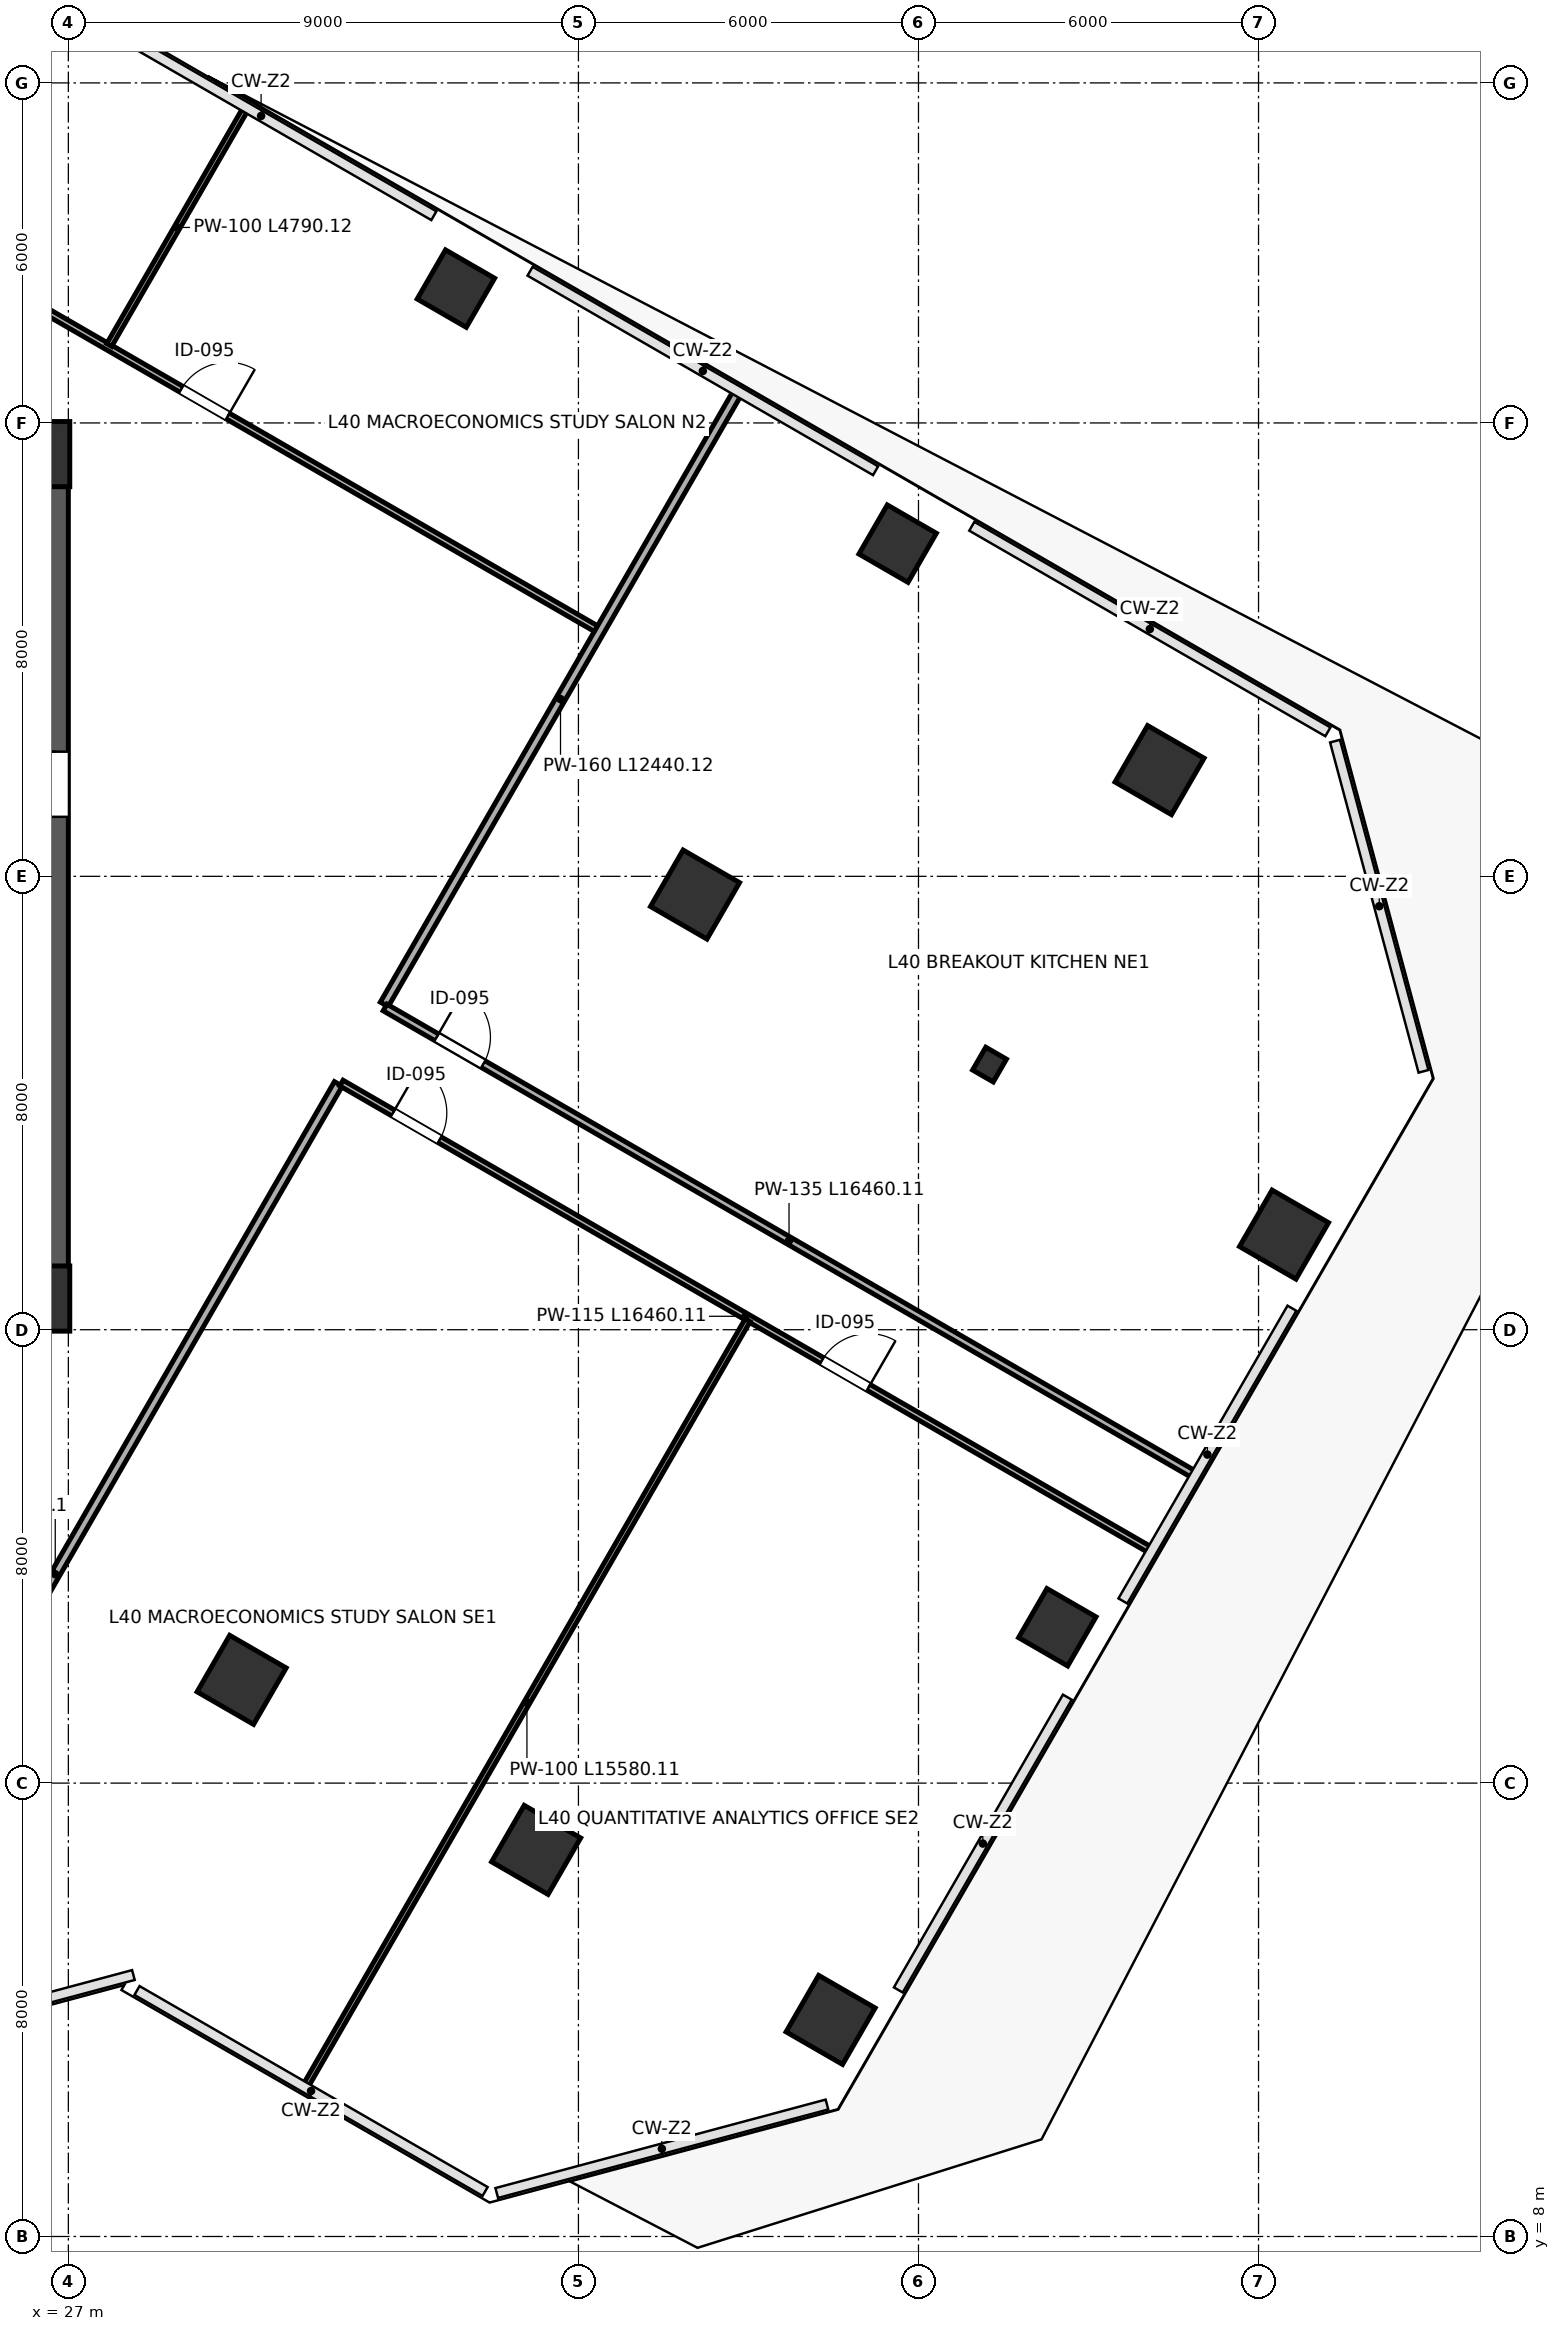
"""IFC4 building model, lengths in metres.
Left out: names, types, materials, properties, quantities, classifications, styles, units other than length and angle.
Written with IfcOpenShell. Run it as: python <this file> out.ifc"""

import sys

from ifc_helpers import new_model, si_unit, direction, frame, frame_2d, origin, origin_2d, place, context, subcontext, project, spatial, rectangle, i_section, extrude, source, transform, mapped, element, fill, save


model = new_model("IFC4")
c1 = context("Model", 3, precision=1e-05, world=origin(), true_north=direction((0.0, 1.0)))
c2 = subcontext(c1, "Body", "Model", "MODEL_VIEW")
j1 = project(units=[si_unit("LENGTHUNIT", "METRE"), si_unit("PLANEANGLEUNIT", "RADIAN")], contexts=[c1])
p1 = place(None, origin())
s1 = spatial("IfcSite", under=j1, at=p1, CompositionType="ELEMENT")
p2 = place(p1, origin())
s2 = spatial("IfcBuilding", under=s1, at=p2, CompositionType="ELEMENT")
p3 = place(p2, frame((0.0, 0.0, 179.2)))
s3 = spatial("IfcBuildingStorey", under=s2, at=p3, CompositionType="ELEMENT", Elevation=179.2)
m1 = source(origin(), c2, "Body", "SweptSolid", [
    extrude(rectangle(XDim=1.15, YDim=1.15, at=origin_2d()), origin(), (0.0, 0.0, 1.0), 4.198),
])
for number, where, z_axis, x_axis in (
    (1, (26.45, 24.55, 0.001), (0.0, 0.0, 1.0), (1.0, 0.0, 0.0)),
    (2, (26.45, 39.45, 0.001), (0.0, 0.0, 1.0), (1.0, 0.0, 0.0)),
):
    element("IfcColumn", number, at=place(p3, frame(where, z_axis=z_axis, x_axis=x_axis)), inside=s3, PredefinedType="COLUMN", context=c2, shape_type="MappedRepresentation", body=[
        mapped(m1, transform((0.0, 0.0, 0.0), scale=1.0)),
    ])
m2 = source(origin(), c2, "Body", "SweptSolid", [
    extrude(rectangle(XDim=1.0, YDim=1.0, at=origin_2d()), origin(), (0.0, 0.0, 1.0), 4.198),
])
for number, where, z_axis, x_axis in (
    (3, (26.044, 46.87, 0.001), (0.0, 0.0, 1.0), (-0.866, 0.5, 0.0)),
    (4, (33.838, 42.37, 0.001), (0.0, 0.0, 1.0), (-0.866, 0.5, 0.0)),
):
    element("IfcColumn", number, at=place(p3, frame(where, z_axis=z_axis, x_axis=x_axis)), inside=s3, PredefinedType="COLUMN", context=c2, shape_type="MappedRepresentation", body=[
        mapped(m2, transform((0.0, 0.0, 0.0), scale=1.0)),
    ])
for number, where, z_axis, x_axis in (
    (5, (30.057, 17.822, 0.001), (0.0, 0.0, 1.0), (-0.866, 0.5, 0.0)),
    (6, (38.057, 31.678, 0.001), (0.0, 0.0, 1.0), (-0.866, 0.5, 0.0)),
):
    element("IfcColumn", number, at=place(p3, frame(where, z_axis=z_axis, x_axis=x_axis)), inside=s3, PredefinedType="COLUMN", context=c2, shape_type="MappedRepresentation", body=[
        mapped(m1, transform((0.0, 0.0, 0.0), scale=1.0)),
    ])
p4 = place(p3, frame((41.632, 37.87, 0.001), z_axis=(0.0, 0.0, 1.0), x_axis=(-0.866025403784, 0.5, 0.0)))
e7 = element("IfcColumn", 7, at=p4, inside=s3, PredefinedType="COLUMN", context=c2, shape_type="MappedRepresentation", body=[
    mapped(m2, transform((0.0, 0.0, 0.0), scale=1.0)),
])
p5 = place(p3, frame((35.253, 14.822, 0.001), z_axis=(0.0, 0.0, 1.0), x_axis=(-0.866025403784, 0.5, 0.0)))
e8 = element("IfcColumn", 8, at=p5, inside=s3, PredefinedType="COLUMN", context=c2, shape_type="MappedRepresentation", body=[
    mapped(m1, transform((0.0, 0.0, 0.0), scale=1.0)),
])
m3 = source(origin(), c2, "Body", "SweptSolid", [
    extrude(i_section(OverallWidth=0.421, OverallDepth=0.465, WebThickness=0.045, FlangeThickness=0.072, FilletRadius=0.015, at=origin_2d()), origin(), (0.0, 0.0, 1.0), 4.198),
])
p6 = place(p3, frame((43.253, 28.678, 0.001), z_axis=(0.0, 0.0, 1.0), x_axis=(-0.866025403784, 0.5, 0.0)))
e9 = element("IfcColumn", 9, at=p6, inside=s3, PredefinedType="COLUMN", context=c2, shape_type="MappedRepresentation", body=[
    mapped(m3, transform((0.0, 0.0, 0.0), scale=1.0)),
])
p7 = place(p3, frame((46.253, 33.875, 0.001), z_axis=(0.0, 0.0, 1.0), x_axis=(-0.866025403784, 0.5, 0.0)))
e10 = element("IfcColumn", 10, at=p7, inside=s3, PredefinedType="COLUMN", context=c2, shape_type="MappedRepresentation", body=[
    mapped(m1, transform((0.0, 0.0, 0.0), scale=1.0)),
])
m4 = source(origin(), c2, "Body", "SweptSolid", [
    extrude(rectangle(XDim=1.15, YDim=1.15, at=origin_2d()), origin(), (0.0, 0.0, 1.0), 4.198),
])
p8 = place(p3, frame((40.45, 11.822, 0.001), z_axis=(0.0, 0.0, 1.0), x_axis=(-0.866025403784, 0.5, 0.0)))
e11 = element("IfcColumn", 11, at=p8, inside=s3, PredefinedType="COLUMN", context=c2, shape_type="MappedRepresentation", body=[
    mapped(m4, transform((0.0, 0.0, 0.0), scale=1.0)),
])
p9 = place(p3, frame((44.45, 18.75, 0.001), z_axis=(0.0, 0.0, 1.0), x_axis=(-0.866025403784, 0.5, 0.0)))
e12 = element("IfcColumn", 12, at=p9, inside=s3, PredefinedType="COLUMN", context=c2, shape_type="MappedRepresentation", body=[
    mapped(m2, transform((0.0, 0.0, 0.0), scale=1.0)),
])
p10 = place(p3, frame((48.45, 25.678, 0.001), z_axis=(0.0, 0.0, 1.0), x_axis=(-0.866025403784, 0.5, 0.0)))
e13 = element("IfcColumn", 13, at=p10, inside=s3, PredefinedType="COLUMN", context=c2, shape_type="MappedRepresentation", body=[
    mapped(m4, transform((0.0, 0.0, 0.0), scale=1.0)),
])
p11 = place(p3, frame((26.775, 24.45, 0.0), z_axis=(0.0, 0.0, 1.0), x_axis=(0.0, 1.0, 0.0)))
e14 = element("IfcWall", 14, at=p11, inside=s3, PredefinedType="SHEAR", context=c2, shape_type="SweptSolid", body=[
    extrude(rectangle(XDim=15.1, YDim=0.45, at=frame_2d((7.55, 0.0))), origin(), (0.0, 0.0, 1.0), 3.96),
])
p12 = place(p11, frame((8.6, 0.0, 0.0)))
e15 = element("IfcOpeningElement", 15, at=p12, cuts=e14, PredefinedType="OPENING", context=c2, shape_type="SweptSolid", body=[
    extrude(rectangle(XDim=1.15, YDim=2.2, at=frame_2d((0.575, 1.1))), frame((0.0, 0.235, 0.0), z_axis=(0.0, -1.0, 0.0), x_axis=(1.0, 0.0, 0.0)), (0.0, 0.0, 1.0), 0.47),
])
for number, where, z_axis, x_axis in (
    (16, (9.0, 24.225, 0.0), (0.0, 0.0, 1.0), (1.0, 0.0, 0.0)),
    (17, (9.0, 39.775, 0.0), (0.0, 0.0, 1.0), (1.0, 0.0, 0.0)),
):
    element("IfcWall", number, at=place(p3, frame(where, z_axis=z_axis, x_axis=x_axis)), inside=s3, PredefinedType="SHEAR", context=c2, shape_type="SweptSolid", body=[
        extrude(rectangle(XDim=18.0, YDim=0.45, at=frame_2d((9.0, 0.0))), origin(), (0.0, 0.0, 1.0), 3.96),
    ])
p13 = place(p3, frame((13.23, 49.696, 0.0), z_axis=(0.0, 0.0, 1.0), x_axis=(0.866026251752, -0.499998531275, 0.0)))
e18 = element("IfcWall", 18, at=p13, inside=s3, PredefinedType="PARTITIONING", context=c2, shape_type="SweptSolid", body=[
    extrude(rectangle(XDim=26.69, YDim=0.115, at=frame_2d((13.345, 0.0))), origin(), (0.0, 0.0, 1.0), 3.96),
])
p14 = place(p13, frame((2.1, 0.0, 0.0)))
e19 = element("IfcOpeningElement", 19, at=p14, cuts=e18, PredefinedType="OPENING", context=c2, shape_type="SweptSolid", body=[
    extrude(rectangle(XDim=0.95, YDim=2.15, at=frame_2d((0.475, 1.075))), frame((0.0, 0.067, 0.0), z_axis=(0.0, -1.0, 0.0), x_axis=(1.0, 0.0, 0.0)), (0.0, 0.0, 1.0), 0.135),
])
p15 = place(p13, frame((18.2, 0.0, 0.0)))
e20 = element("IfcOpeningElement", 20, at=p15, cuts=e18, PredefinedType="OPENING", context=c2, shape_type="SweptSolid", body=[
    extrude(rectangle(XDim=0.95, YDim=2.15, at=frame_2d((0.475, 1.075))), frame((0.0, 0.067, 0.0), z_axis=(0.0, -1.0, 0.0), x_axis=(1.0, 0.0, 0.0)), (0.0, 0.0, 1.0), 0.135),
])
p16 = place(p3, frame((27.721, 41.375, 0.0), z_axis=(0.0, 0.0, 1.0), x_axis=(0.500009234706, 0.866020072059, 0.0)))
e21 = element("IfcWall", 21, at=p16, inside=s3, PredefinedType="PARTITIONING", context=c2, shape_type="SweptSolid", body=[
    extrude(rectangle(XDim=4.79, YDim=0.1, at=frame_2d((2.395, 0.0))), origin(), (0.0, 0.0, 1.0), 3.195),
])
p17 = place(p3, frame((32.574, 29.74, 0.0), z_axis=(0.0, 0.0, 1.0), x_axis=(0.499986899807, 0.866032967052, 0.0)))
e22 = element("IfcWall", 22, at=p17, inside=s3, PredefinedType="PARTITIONING", context=c2, shape_type="SweptSolid", body=[
    extrude(rectangle(XDim=12.44, YDim=0.16, at=frame_2d((6.22, 0.0))), origin(), (0.0, 0.0, 1.0), 3.195),
])
p18 = place(p3, frame((21.774, 11.034, 0.0), z_axis=(0.0, 0.0, 1.0), x_axis=(0.500008037328, 0.866020763381, 0.0)))
e23 = element("IfcWall", 23, at=p18, inside=s3, PredefinedType="PARTITIONING", context=c2, shape_type="SweptSolid", body=[
    extrude(rectangle(XDim=19.98, YDim=0.16, at=frame_2d((9.99, 0.0))), origin(), (0.0, 0.0, 1.0), 3.96),
])
p19 = place(p3, frame((32.588, 29.686, 0.0), z_axis=(0.0, 0.0, 1.0), x_axis=(0.86602750728, -0.499996356621, 0.0)))
e24 = element("IfcWall", 24, at=p19, inside=s3, PredefinedType="PARTITIONING", context=c2, shape_type="SweptSolid", body=[
    extrude(rectangle(XDim=16.46, YDim=0.135, at=frame_2d((8.23, 0.0))), origin(), (0.0, 0.0, 1.0), 3.96),
])
p20 = place(p19, frame((1.05, 0.0, 0.0)))
e25 = element("IfcOpeningElement", 25, at=p20, cuts=e24, PredefinedType="OPENING", context=c2, shape_type="SweptSolid", body=[
    extrude(rectangle(XDim=0.95, YDim=2.15, at=frame_2d((0.475, 1.075))), frame((0.0, 0.078, 0.0), z_axis=(0.0, -1.0, 0.0), x_axis=(1.0, 0.0, 0.0)), (0.0, 0.0, 1.0), 0.155),
])
p21 = place(p3, frame((31.818, 28.352, 0.0), z_axis=(0.0, 0.0, 1.0), x_axis=(0.86602750728, -0.499996356621, 0.0)))
e26 = element("IfcWall", 26, at=p21, inside=s3, PredefinedType="PARTITIONING", context=c2, shape_type="SweptSolid", body=[
    extrude(rectangle(XDim=16.46, YDim=0.115, at=frame_2d((8.23, 0.0))), origin(), (0.0, 0.0, 1.0), 3.96),
])
p22 = place(p21, frame((1.05, 0.0, 0.0)))
e27 = element("IfcOpeningElement", 27, at=p22, cuts=e26, PredefinedType="OPENING", context=c2, shape_type="SweptSolid", body=[
    extrude(rectangle(XDim=0.95, YDim=2.15, at=frame_2d((0.475, 1.075))), frame((0.0, 0.067, 0.0), z_axis=(0.0, -1.0, 0.0), x_axis=(1.0, 0.0, 0.0)), (0.0, 0.0, 1.0), 0.135),
])
p23 = place(p21, frame((9.79, 0.0, 0.0)))
e28 = element("IfcOpeningElement", 28, at=p23, cuts=e26, PredefinedType="OPENING", context=c2, shape_type="SweptSolid", body=[
    extrude(rectangle(XDim=0.95, YDim=2.15, at=frame_2d((0.475, 1.075))), frame((0.0, 0.067, 0.0), z_axis=(0.0, -1.0, 0.0), x_axis=(1.0, 0.0, 0.0)), (0.0, 0.0, 1.0), 0.135),
])
p24 = place(p3, frame((31.196, 10.675, 0.0), z_axis=(0.0, 0.0, 1.0), x_axis=(0.500001880682, 0.866024317969, 0.0)))
e29 = element("IfcWall", 29, at=p24, inside=s3, PredefinedType="PARTITIONING", context=c2, shape_type="SweptSolid", body=[
    extrude(rectangle(XDim=15.58, YDim=0.1, at=frame_2d((7.79, 0.0))), origin(), (0.0, 0.0, 1.0), 3.96),
])
m5 = source(origin(), c2, "Body", "SweptSolid", [
    extrude(rectangle(XDim=1.15, YDim=2.2, at=frame_2d((0.575, 1.1))), frame((0.0, 0.025, 0.0), z_axis=(0.0, -1.0, 0.0), x_axis=(1.0, 0.0, 0.0)), (0.0, 0.0, 1.0), 0.05),
])
p25 = place(p12, origin())
e30 = element("IfcDoor", 30, at=p25, inside=s3, OperationType="SINGLE_SWING_RIGHT", PredefinedType="DOOR", context=c2, shape_type="MappedRepresentation", body=[
    mapped(m5, transform((0.0, 0.0, 0.0), scale=1.0)),
])
fill(e15, e30)
m6 = source(origin(), c2, "Body", "SweptSolid", [
    extrude(rectangle(XDim=0.95, YDim=2.15, at=frame_2d((0.475, 1.075))), frame((0.0, 0.025, 0.0), z_axis=(0.0, -1.0, 0.0), x_axis=(1.0, 0.0, 0.0)), (0.0, 0.0, 1.0), 0.05),
])
p26 = place(p15, origin())
e31 = element("IfcDoor", 31, at=p26, inside=s3, OperationType="SINGLE_SWING_RIGHT", PredefinedType="DOOR", context=c2, shape_type="MappedRepresentation", body=[
    mapped(m6, transform((0.0, 0.0, 0.0), scale=1.0)),
])
fill(e20, e31)
p27 = place(p20, origin())
e32 = element("IfcDoor", 32, at=p27, inside=s3, OperationType="SINGLE_SWING_LEFT", PredefinedType="DOOR", context=c2, shape_type="MappedRepresentation", body=[
    mapped(m6, transform((0.0, 0.0, 0.0), scale=1.0)),
])
fill(e25, e32)
p28 = place(p22, origin())
e33 = element("IfcDoor", 33, at=p28, inside=s3, OperationType="SINGLE_SWING_LEFT", PredefinedType="DOOR", context=c2, shape_type="MappedRepresentation", body=[
    mapped(m6, transform((0.0, 0.0, 0.0), scale=1.0)),
])
fill(e27, e33)
p29 = place(p23, origin())
e34 = element("IfcDoor", 34, at=p29, inside=s3, OperationType="SINGLE_SWING_RIGHT", PredefinedType="DOOR", context=c2, shape_type="MappedRepresentation", body=[
    mapped(m6, transform((0.0, 0.0, 0.0), scale=1.0)),
])
fill(e28, e34)
save(model, sys.argv[1])
